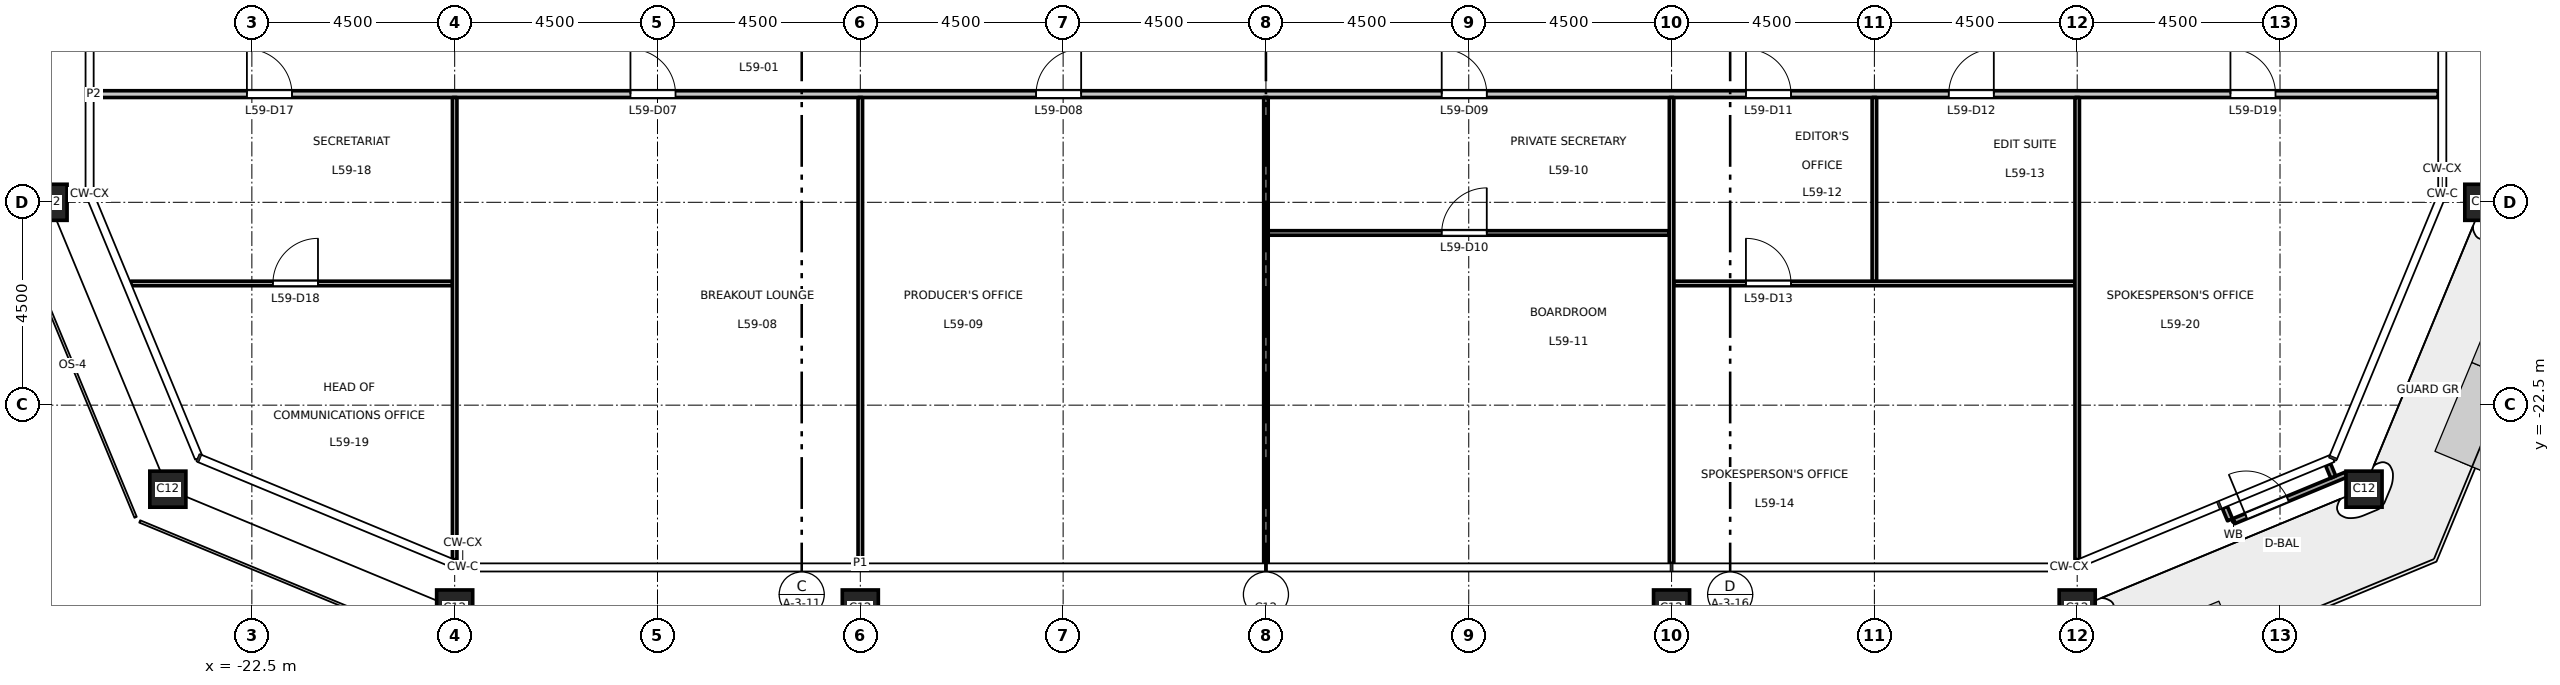
"""IFC4 building model, lengths in metres.
Left out: names, types, materials, properties, quantities, classifications, styles, units other than length and angle.
Written with IfcOpenShell. Run it as: python <this file> out.ifc"""

import sys

from ifc_helpers import new_model, si_unit, direction, frame, frame_2d, origin, origin_2d, place, context, subcontext, project, spatial, rectangle, hollow_rectangle, extrude, element, fill, save


model = new_model("IFC4")
c1 = context("Model", 3, precision=1e-05, world=origin(), true_north=direction((0.0, 1.0)))
c2 = subcontext(c1, "Body", "Model", "MODEL_VIEW")
j1 = project(units=[si_unit("LENGTHUNIT", "METRE"), si_unit("PLANEANGLEUNIT", "RADIAN")], contexts=[c1])
p1 = place(None, origin())
s1 = spatial("IfcSite", under=j1, at=p1, CompositionType="ELEMENT")
p2 = place(p1, origin())
s2 = spatial("IfcBuilding", under=s1, at=p2, CompositionType="ELEMENT")
p3 = place(p2, frame((0.0, 0.0, 273.7)))
s3 = spatial("IfcBuildingStorey", under=s2, at=p3, CompositionType="ELEMENT", Elevation=273.7)
for number, where, z_axis, x_axis in (
    (1, (-18.0, -27.0, 0.0), (0.0, 0.0, 1.0), (1.0, 0.0, 0.0)),
    (2, (-9.0, -27.0, 0.0), (0.0, 0.0, 1.0), (1.0, 0.0, 0.0)),
    (3, (0.0, -27.0, 0.0), (0.0, 0.0, 1.0), (1.0, 0.0, 0.0)),
    (4, (9.0, -27.0, 0.0), (0.0, 0.0, 1.0), (1.0, 0.0, 0.0)),
    (5, (18.0, -27.0, 0.0), (0.0, 0.0, 1.0), (1.0, 0.0, 0.0)),
    (6, (24.364, -24.364, 0.0), (0.0, 0.0, 1.0), (1.0, 0.0, 0.0)),
    (7, (27.0, -18.0, 0.0), (0.0, 0.0, 1.0), (1.0, 0.0, 0.0)),
    (8, (-27.0, -18.0, 0.0), (0.0, 0.0, 1.0), (1.0, 0.0, 0.0)),
    (9, (-24.364, -24.364, 0.0), (0.0, 0.0, 1.0), (1.0, 0.0, 0.0)),
):
    element("IfcColumn", number, at=place(p3, frame(where, z_axis=z_axis, x_axis=x_axis)), inside=s3, PredefinedType="COLUMN", context=c2, shape_type="SweptSolid", body=[
        extrude(hollow_rectangle(XDim=0.8, YDim=0.8, WallThickness=0.045, at=origin_2d()), origin(), (0.0, 0.0, 1.0), 4.5),
    ])
p4 = place(p3, frame((21.276, -24.766, 0.0), z_axis=(0.0, 0.0, 1.0), x_axis=(0.382591441855, -0.923917630863, 0.0)))
e10 = element("IfcWall", 10, at=p4, inside=s3, PredefinedType="STANDARD", context=c2, shape_type="SweptSolid", body=[
    extrude(rectangle(XDim=0.3, YDim=0.12, at=frame_2d((0.15, 0.0))), origin(), (0.0, 0.0, 1.0), 4.3),
])
p5 = place(p3, frame((23.566, -23.818, 0.0), z_axis=(0.0, 0.0, 1.0), x_axis=(0.383285987724, -0.923629715641, 0.0)))
e11 = element("IfcWall", 11, at=p5, inside=s3, PredefinedType="STANDARD", context=c2, shape_type="SweptSolid", body=[
    extrude(rectangle(XDim=0.3, YDim=0.12, at=frame_2d((0.15, 0.0))), origin(), (0.0, 0.0, 1.0), 4.3),
])
p6 = place(p3, frame((21.469, -25.076, 0.0), z_axis=(0.0, 0.0, 1.0), x_axis=(0.923874686516, 0.382695131424, 0.0)))
e12 = element("IfcWall", 12, at=p6, inside=s3, PredefinedType="STANDARD", context=c2, shape_type="SweptSolid", body=[
    extrude(rectangle(XDim=2.7, YDim=0.12, at=frame_2d((1.35, 0.0))), origin(), (0.0, 0.0, 1.0), 4.3),
])
p7 = place(p6, frame((0.3, 0.0, 0.0)))
e13 = element("IfcOpeningElement", 13, at=p7, cuts=e12, PredefinedType="OPENING", context=c2, shape_type="SweptSolid", body=[
    extrude(rectangle(XDim=1.0, YDim=2.4, at=frame_2d((0.5, 1.2))), frame((0.0, 0.07, 0.0), z_axis=(0.0, -1.0, 0.0), x_axis=(1.0, 0.0, 0.0)), (0.0, 0.0, 1.0), 0.14),
])
p8 = place(p3, frame((-25.183, -19.8, 0.0), z_axis=(0.0, 0.0, 1.0), x_axis=(1.0, 0.0, 0.0)))
e14 = element("IfcWall", 14, at=p8, inside=s3, PredefinedType="PARTITIONING", context=c2, shape_type="SweptSolid", body=[
    extrude(rectangle(XDim=7.133, YDim=0.1, at=frame_2d((3.566, 0.0))), origin(), (0.0, 0.0, 1.0), 4.3),
])
p9 = place(p8, frame((3.15, 0.0, 0.0)))
e15 = element("IfcOpeningElement", 15, at=p9, cuts=e14, PredefinedType="OPENING", context=c2, shape_type="SweptSolid", body=[
    extrude(rectangle(XDim=1.0, YDim=2.1, at=frame_2d((0.5, 1.05))), frame((0.0, 0.06, 0.0), z_axis=(0.0, -1.0, 0.0), x_axis=(1.0, 0.0, 0.0)), (0.0, 0.0, 1.0), 0.12),
])
p10 = place(p3, frame((9.05, -19.8, 0.0), z_axis=(0.0, 0.0, 1.0), x_axis=(1.0, 0.0, 0.0)))
e16 = element("IfcWall", 16, at=p10, inside=s3, PredefinedType="PARTITIONING", context=c2, shape_type="SweptSolid", body=[
    extrude(rectangle(XDim=8.9, YDim=0.1, at=frame_2d((4.45, 0.0))), origin(), (0.0, 0.0, 1.0), 4.3),
])
p11 = place(p10, frame((1.6, 0.0, 0.0)))
e17 = element("IfcOpeningElement", 17, at=p11, cuts=e16, PredefinedType="OPENING", context=c2, shape_type="SweptSolid", body=[
    extrude(rectangle(XDim=1.0, YDim=2.1, at=frame_2d((0.5, 1.05))), frame((0.0, 0.06, 0.0), z_axis=(0.0, -1.0, 0.0), x_axis=(1.0, 0.0, 0.0)), (0.0, 0.0, 1.0), 0.12),
])
p12 = place(p3, frame((0.05, -18.68, 0.0), z_axis=(0.0, 0.0, 1.0), x_axis=(1.0, 0.0, 0.0)))
e18 = element("IfcWall", 18, at=p12, inside=s3, PredefinedType="PARTITIONING", context=c2, shape_type="SweptSolid", body=[
    extrude(rectangle(XDim=8.9, YDim=0.1, at=frame_2d((4.45, 0.0))), origin(), (0.0, 0.0, 1.0), 4.3),
])
p13 = place(p12, frame((3.85, 0.0, 0.0)))
e19 = element("IfcOpeningElement", 19, at=p13, cuts=e18, PredefinedType="OPENING", context=c2, shape_type="SweptSolid", body=[
    extrude(rectangle(XDim=1.0, YDim=2.1, at=frame_2d((0.5, 1.05))), frame((0.0, 0.06, 0.0), z_axis=(0.0, -1.0, 0.0), x_axis=(1.0, 0.0, 0.0)), (0.0, 0.0, 1.0), 0.12),
])
p14 = place(p3, frame((-26.01, -15.6, 0.0), z_axis=(0.0, 0.0, 1.0), x_axis=(1.0, 0.0, 0.0)))
e20 = element("IfcWall", 20, at=p14, inside=s3, PredefinedType="PARTITIONING", context=c2, shape_type="SweptSolid", body=[
    extrude(rectangle(XDim=52.02, YDim=0.15, at=frame_2d((26.01, 0.0))), origin(), (0.0, 0.0, 1.0), 4.3),
])
p15 = place(p14, frame((11.91, 0.0, 0.0)))
e21 = element("IfcOpeningElement", 21, at=p15, cuts=e20, PredefinedType="OPENING", context=c2, shape_type="SweptSolid", body=[
    extrude(rectangle(XDim=1.0, YDim=2.1, at=frame_2d((0.5, 1.05))), frame((0.0, 0.085, 0.0), z_axis=(0.0, -1.0, 0.0), x_axis=(1.0, 0.0, 0.0)), (0.0, 0.0, 1.0), 0.17),
])
p16 = place(p14, frame((20.91, 0.0, 0.0)))
e22 = element("IfcOpeningElement", 22, at=p16, cuts=e20, PredefinedType="OPENING", context=c2, shape_type="SweptSolid", body=[
    extrude(rectangle(XDim=1.0, YDim=2.1, at=frame_2d((0.5, 1.05))), frame((0.0, 0.085, 0.0), z_axis=(0.0, -1.0, 0.0), x_axis=(1.0, 0.0, 0.0)), (0.0, 0.0, 1.0), 0.17),
])
p17 = place(p14, frame((29.91, 0.0, 0.0)))
e23 = element("IfcOpeningElement", 23, at=p17, cuts=e20, PredefinedType="OPENING", context=c2, shape_type="SweptSolid", body=[
    extrude(rectangle(XDim=1.0, YDim=2.1, at=frame_2d((0.5, 1.05))), frame((0.0, 0.085, 0.0), z_axis=(0.0, -1.0, 0.0), x_axis=(1.0, 0.0, 0.0)), (0.0, 0.0, 1.0), 0.17),
])
p18 = place(p14, frame((36.66, 0.0, 0.0)))
e24 = element("IfcOpeningElement", 24, at=p18, cuts=e20, PredefinedType="OPENING", context=c2, shape_type="SweptSolid", body=[
    extrude(rectangle(XDim=1.0, YDim=2.1, at=frame_2d((0.5, 1.05))), frame((0.0, 0.085, 0.0), z_axis=(0.0, -1.0, 0.0), x_axis=(1.0, 0.0, 0.0)), (0.0, 0.0, 1.0), 0.17),
])
p19 = place(p14, frame((41.16, 0.0, 0.0)))
e25 = element("IfcOpeningElement", 25, at=p19, cuts=e20, PredefinedType="OPENING", context=c2, shape_type="SweptSolid", body=[
    extrude(rectangle(XDim=1.0, YDim=2.1, at=frame_2d((0.5, 1.05))), frame((0.0, 0.085, 0.0), z_axis=(0.0, -1.0, 0.0), x_axis=(1.0, 0.0, 0.0)), (0.0, 0.0, 1.0), 0.17),
])
p20 = place(p14, frame((3.4, 0.0, 0.0)))
e26 = element("IfcOpeningElement", 26, at=p20, cuts=e20, PredefinedType="OPENING", context=c2, shape_type="SweptSolid", body=[
    extrude(rectangle(XDim=1.0, YDim=2.1, at=frame_2d((0.5, 1.05))), frame((0.0, 0.085, 0.0), z_axis=(0.0, -1.0, 0.0), x_axis=(1.0, 0.0, 0.0)), (0.0, 0.0, 1.0), 0.17),
])
p21 = place(p14, frame((47.41, 0.0, 0.0)))
e27 = element("IfcOpeningElement", 27, at=p21, cuts=e20, PredefinedType="OPENING", context=c2, shape_type="SweptSolid", body=[
    extrude(rectangle(XDim=1.0, YDim=2.1, at=frame_2d((0.5, 1.05))), frame((0.0, 0.085, 0.0), z_axis=(0.0, -1.0, 0.0), x_axis=(1.0, 0.0, 0.0)), (0.0, 0.0, 1.0), 0.17),
])
p22 = place(p3, frame((-18.0, -25.928, 0.0), z_axis=(0.0, 0.0, 1.0), x_axis=(0.0, 1.0, 0.0)))
e28 = element("IfcWall", 28, at=p22, inside=s3, PredefinedType="PARTITIONING", context=c2, shape_type="SweptSolid", body=[
    extrude(rectangle(XDim=10.253, YDim=0.1, at=frame_2d((5.126, 0.0))), origin(), (0.0, 0.0, 1.0), 3.6),
])
p23 = place(p3, frame((-9.0, -26.01, 0.0), z_axis=(0.0, 0.0, 1.0), x_axis=(0.0, 1.0, 0.0)))
e29 = element("IfcWall", 29, at=p23, inside=s3, PredefinedType="PARTITIONING", context=c2, shape_type="SweptSolid", body=[
    extrude(rectangle(XDim=10.335, YDim=0.1, at=frame_2d((5.167, 0.0))), origin(), (0.0, 0.0, 1.0), 3.6),
])
p24 = place(p3, frame((0.0, -26.01, 0.0), z_axis=(0.0, 0.0, 1.0), x_axis=(0.0, 1.0, 0.0)))
e30 = element("IfcWall", 30, at=p24, inside=s3, PredefinedType="PARTITIONING", context=c2, shape_type="SweptSolid", body=[
    extrude(rectangle(XDim=10.335, YDim=0.1, at=frame_2d((5.167, 0.0))), origin(), (0.0, 0.0, 1.0), 3.5),
])
p25 = place(p3, frame((9.0, -26.01, 0.0), z_axis=(0.0, 0.0, 1.0), x_axis=(0.0, 1.0, 0.0)))
e31 = element("IfcWall", 31, at=p25, inside=s3, PredefinedType="PARTITIONING", context=c2, shape_type="SweptSolid", body=[
    extrude(rectangle(XDim=10.335, YDim=0.1, at=frame_2d((5.167, 0.0))), origin(), (0.0, 0.0, 1.0), 3.6),
])
p26 = place(p3, frame((13.5, -19.75, 0.0), z_axis=(0.0, 0.0, 1.0), x_axis=(0.0, 1.0, 0.0)))
e32 = element("IfcWall", 32, at=p26, inside=s3, PredefinedType="PARTITIONING", context=c2, shape_type="SweptSolid", body=[
    extrude(rectangle(XDim=4.075, YDim=0.1, at=frame_2d((2.038, 0.0))), origin(), (0.0, 0.0, 1.0), 4.3),
])
p27 = place(p3, frame((18.0, -25.928, 0.0), z_axis=(0.0, 0.0, 1.0), x_axis=(0.0, 1.0, 0.0)))
e33 = element("IfcWall", 33, at=p27, inside=s3, PredefinedType="PARTITIONING", context=c2, shape_type="SweptSolid", body=[
    extrude(rectangle(XDim=10.253, YDim=0.1, at=frame_2d((5.126, 0.0))), origin(), (0.0, 0.0, 1.0), 3.6),
])
p28 = place(p7, origin())
e34 = element("IfcDoor", 34, at=p28, inside=s3, OperationType="SINGLE_SWING_LEFT", PredefinedType="DOOR", context=c2, shape_type="SweptSolid", body=[
    extrude(rectangle(XDim=1.0, YDim=2.4, at=frame_2d((0.5, 1.2))), frame((0.0, 0.025, 0.0), z_axis=(0.0, -1.0, 0.0), x_axis=(1.0, 0.0, 0.0)), (0.0, 0.0, 1.0), 0.05),
])
fill(e13, e34)
p29 = place(p15, origin())
e35 = element("IfcDoor", 35, at=p29, inside=s3, OperationType="SINGLE_SWING_LEFT", PredefinedType="DOOR", context=c2, shape_type="SweptSolid", body=[
    extrude(rectangle(XDim=1.0, YDim=2.1, at=frame_2d((0.5, 1.05))), frame((0.0, 0.025, 0.0), z_axis=(0.0, -1.0, 0.0), x_axis=(1.0, 0.0, 0.0)), (0.0, 0.0, 1.0), 0.05),
])
fill(e21, e35)
p30 = place(p16, origin())
e36 = element("IfcDoor", 36, at=p30, inside=s3, OperationType="SINGLE_SWING_RIGHT", PredefinedType="DOOR", context=c2, shape_type="SweptSolid", body=[
    extrude(rectangle(XDim=1.0, YDim=2.1, at=frame_2d((0.5, 1.05))), frame((0.0, 0.025, 0.0), z_axis=(0.0, -1.0, 0.0), x_axis=(1.0, 0.0, 0.0)), (0.0, 0.0, 1.0), 0.05),
])
fill(e22, e36)
p31 = place(p17, origin())
e37 = element("IfcDoor", 37, at=p31, inside=s3, OperationType="SINGLE_SWING_LEFT", PredefinedType="DOOR", context=c2, shape_type="SweptSolid", body=[
    extrude(rectangle(XDim=1.0, YDim=2.1, at=frame_2d((0.5, 1.05))), frame((0.0, 0.025, 0.0), z_axis=(0.0, -1.0, 0.0), x_axis=(1.0, 0.0, 0.0)), (0.0, 0.0, 1.0), 0.05),
])
fill(e23, e37)
p32 = place(p13, origin())
e38 = element("IfcDoor", 38, at=p32, inside=s3, OperationType="SINGLE_SWING_RIGHT", PredefinedType="DOOR", context=c2, shape_type="SweptSolid", body=[
    extrude(rectangle(XDim=1.0, YDim=2.1, at=frame_2d((0.5, 1.05))), frame((0.0, 0.025, 0.0), z_axis=(0.0, -1.0, 0.0), x_axis=(1.0, 0.0, 0.0)), (0.0, 0.0, 1.0), 0.05),
])
fill(e19, e38)
p33 = place(p18, origin())
e39 = element("IfcDoor", 39, at=p33, inside=s3, OperationType="SINGLE_SWING_LEFT", PredefinedType="DOOR", context=c2, shape_type="SweptSolid", body=[
    extrude(rectangle(XDim=1.0, YDim=2.1, at=frame_2d((0.5, 1.05))), frame((0.0, 0.025, 0.0), z_axis=(0.0, -1.0, 0.0), x_axis=(1.0, 0.0, 0.0)), (0.0, 0.0, 1.0), 0.05),
])
fill(e24, e39)
p34 = place(p19, origin())
e40 = element("IfcDoor", 40, at=p34, inside=s3, OperationType="SINGLE_SWING_RIGHT", PredefinedType="DOOR", context=c2, shape_type="SweptSolid", body=[
    extrude(rectangle(XDim=1.0, YDim=2.1, at=frame_2d((0.5, 1.05))), frame((0.0, 0.025, 0.0), z_axis=(0.0, -1.0, 0.0), x_axis=(1.0, 0.0, 0.0)), (0.0, 0.0, 1.0), 0.05),
])
fill(e25, e40)
p35 = place(p11, origin())
e41 = element("IfcDoor", 41, at=p35, inside=s3, OperationType="SINGLE_SWING_LEFT", PredefinedType="DOOR", context=c2, shape_type="SweptSolid", body=[
    extrude(rectangle(XDim=1.0, YDim=2.1, at=frame_2d((0.5, 1.05))), frame((0.0, 0.025, 0.0), z_axis=(0.0, -1.0, 0.0), x_axis=(1.0, 0.0, 0.0)), (0.0, 0.0, 1.0), 0.05),
])
fill(e17, e41)
p36 = place(p20, origin())
e42 = element("IfcDoor", 42, at=p36, inside=s3, OperationType="SINGLE_SWING_LEFT", PredefinedType="DOOR", context=c2, shape_type="SweptSolid", body=[
    extrude(rectangle(XDim=1.0, YDim=2.1, at=frame_2d((0.5, 1.05))), frame((0.0, 0.025, 0.0), z_axis=(0.0, -1.0, 0.0), x_axis=(1.0, 0.0, 0.0)), (0.0, 0.0, 1.0), 0.05),
])
fill(e26, e42)
p37 = place(p9, origin())
e43 = element("IfcDoor", 43, at=p37, inside=s3, OperationType="SINGLE_SWING_RIGHT", PredefinedType="DOOR", context=c2, shape_type="SweptSolid", body=[
    extrude(rectangle(XDim=1.0, YDim=2.1, at=frame_2d((0.5, 1.05))), frame((0.0, 0.025, 0.0), z_axis=(0.0, -1.0, 0.0), x_axis=(1.0, 0.0, 0.0)), (0.0, 0.0, 1.0), 0.05),
])
fill(e15, e43)
p38 = place(p21, origin())
e44 = element("IfcDoor", 44, at=p38, inside=s3, OperationType="SINGLE_SWING_LEFT", PredefinedType="DOOR", context=c2, shape_type="SweptSolid", body=[
    extrude(rectangle(XDim=1.0, YDim=2.1, at=frame_2d((0.5, 1.05))), frame((0.0, 0.025, 0.0), z_axis=(0.0, -1.0, 0.0), x_axis=(1.0, 0.0, 0.0)), (0.0, 0.0, 1.0), 0.05),
])
fill(e27, e44)
save(model, sys.argv[1])
